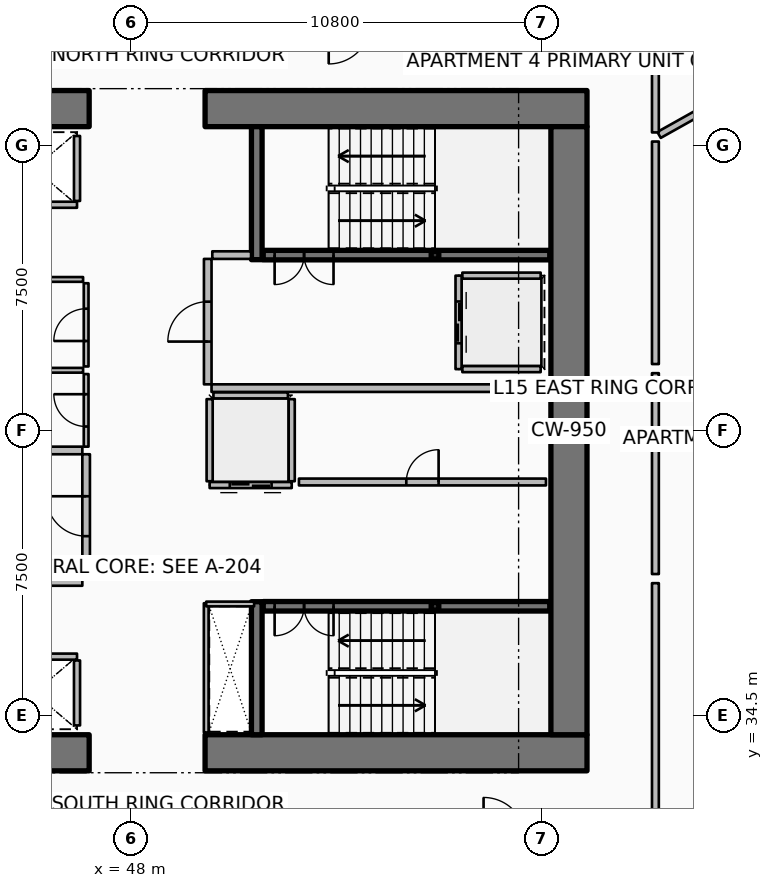
"""IFC4 building model, lengths in metres.
Left out: names, types, materials, properties, quantities, classifications, styles, units other than length and angle.
Written with IfcOpenShell. Run it as: python <this file> out.ifc"""

import sys

from ifc_helpers import new_model, si_unit, direction, frame, frame_2d, origin, origin_2d, place, context, subcontext, project, spatial, rectangle, hollow_rectangle, extrude, element, fill, save


model = new_model("IFC4")
c1 = context("Model", 3, precision=1e-05, world=origin(), true_north=direction((0.0, 1.0)))
c2 = subcontext(c1, "Body", "Model", "MODEL_VIEW")
j1 = project(units=[si_unit("LENGTHUNIT", "METRE"), si_unit("PLANEANGLEUNIT", "RADIAN")], contexts=[c1])
p1 = place(None, origin())
s1 = spatial("IfcSite", under=j1, at=p1, CompositionType="ELEMENT")
p2 = place(p1, origin())
s2 = spatial("IfcBuilding", under=s1, at=p2, CompositionType="ELEMENT")
p3 = place(p2, frame((0.0, 0.0, 63.9)))
s3 = spatial("IfcBuildingStorey", under=s2, at=p3, CompositionType="ELEMENT", Elevation=63.9)
p4 = place(p3, frame((36.85, 33.525, 0.0), z_axis=(0.0, 0.0, 1.0), x_axis=(1.0, 0.0, 0.0)))
e1 = element("IfcWall", 1, at=p4, inside=s3, PredefinedType="SHEAR", context=c2, shape_type="SweptSolid", body=[
    extrude(rectangle(XDim=10.05, YDim=0.95, at=frame_2d((5.025, 0.0))), origin(), (0.0, 0.0, 1.0), 3.75),
])
p5 = place(p3, frame((49.95, 33.525, 0.0), z_axis=(0.0, 0.0, 1.0), x_axis=(1.0, 0.0, 0.0)))
e2 = element("IfcWall", 2, at=p5, inside=s3, PredefinedType="SHEAR", context=c2, shape_type="SweptSolid", body=[
    extrude(rectangle(XDim=10.05, YDim=0.95, at=frame_2d((5.025, 0.0))), origin(), (0.0, 0.0, 1.0), 3.75),
])
p6 = place(p3, frame((36.85, 50.475, 0.0), z_axis=(0.0, 0.0, 1.0), x_axis=(1.0, 0.0, 0.0)))
e3 = element("IfcWall", 3, at=p6, inside=s3, PredefinedType="SHEAR", context=c2, shape_type="SweptSolid", body=[
    extrude(rectangle(XDim=10.05, YDim=0.95, at=frame_2d((5.025, 0.0))), origin(), (0.0, 0.0, 1.0), 3.75),
])
p7 = place(p3, frame((49.95, 50.475, 0.0), z_axis=(0.0, 0.0, 1.0), x_axis=(1.0, 0.0, 0.0)))
e4 = element("IfcWall", 4, at=p7, inside=s3, PredefinedType="SHEAR", context=c2, shape_type="SweptSolid", body=[
    extrude(rectangle(XDim=10.05, YDim=0.95, at=frame_2d((5.025, 0.0))), origin(), (0.0, 0.0, 1.0), 3.75),
])
p8 = place(p3, frame((59.525, 34.0, 0.0), z_axis=(0.0, 0.0, 1.0), x_axis=(0.0, 1.0, 0.0)))
e5 = element("IfcWall", 5, at=p8, inside=s3, PredefinedType="SHEAR", context=c2, shape_type="SweptSolid", body=[
    extrude(rectangle(XDim=16.0, YDim=0.95, at=frame_2d((8.0, 0.0))), origin(), (0.0, 0.0, 1.0), 3.75),
])
for number, where, z_axis, x_axis in (
    (6, (51.31, 46.5, 0.0), (0.0, 0.0, 1.0), (0.0, 1.0, 0.0)),
    (7, (51.31, 34.0, 0.0), (0.0, 0.0, 1.0), (0.0, 1.0, 0.0)),
):
    element("IfcWall", number, at=place(p3, frame(where, z_axis=z_axis, x_axis=x_axis)), inside=s3, PredefinedType="SHEAR", context=c2, shape_type="SweptSolid", body=[
        extrude(rectangle(XDim=3.5, YDim=0.28, at=frame_2d((1.75, 0.0))), origin(), (0.0, 0.0, 1.0), 3.75),
    ])
for number, where, z_axis, x_axis in (
    (8, (56.0, 46.62, 0.0), (0.0, 0.0, 1.0), (1.0, 0.0, 0.0)),
    (9, (56.0, 37.38, 0.0), (0.0, 0.0, 1.0), (1.0, 0.0, 0.0)),
):
    element("IfcColumn", number, at=place(p3, frame(where, z_axis=z_axis, x_axis=x_axis)), inside=s3, PredefinedType="COLUMN", context=c2, shape_type="SweptSolid", body=[
        extrude(hollow_rectangle(XDim=0.2, YDim=0.2, WallThickness=0.01, InnerFilletRadius=0.01, OuterFilletRadius=0.02, at=origin_2d()), origin(), (0.0, 0.0, 1.0), 1.67),
    ])
p9 = place(p3, frame((51.48, 46.62, 0.0), z_axis=(0.0, 0.0, 1.0), x_axis=(1.0, 0.0, 0.0)))
e10 = element("IfcWall", 10, at=p9, inside=s3, PredefinedType="SOLIDWALL", context=c2, shape_type="SweptSolid", body=[
    extrude(rectangle(XDim=7.54, YDim=0.25, at=frame_2d((3.77, 0.0))), origin(), (0.0, 0.0, 1.0), 3.5),
])
p10 = place(p9, frame((0.3, 0.0, 0.0)))
e11 = element("IfcOpeningElement", 11, at=p10, cuts=e10, PredefinedType="OPENING", context=c2, shape_type="SweptSolid", body=[
    extrude(rectangle(XDim=1.55, YDim=2.15, at=frame_2d((0.775, 1.075))), frame((0.0, 0.135, 0.0), z_axis=(0.0, -1.0, 0.0), x_axis=(1.0, 0.0, 0.0)), (0.0, 0.0, 1.0), 0.27),
])
p11 = place(p3, frame((51.48, 37.38, 0.0), z_axis=(0.0, 0.0, 1.0), x_axis=(1.0, 0.0, 0.0)))
e12 = element("IfcWall", 12, at=p11, inside=s3, PredefinedType="SOLIDWALL", context=c2, shape_type="SweptSolid", body=[
    extrude(rectangle(XDim=7.54, YDim=0.25, at=frame_2d((3.77, 0.0))), origin(), (0.0, 0.0, 1.0), 3.5),
])
p12 = place(p11, frame((0.3, 0.0, 0.0)))
e13 = element("IfcOpeningElement", 13, at=p12, cuts=e12, PredefinedType="OPENING", context=c2, shape_type="SweptSolid", body=[
    extrude(rectangle(XDim=1.55, YDim=2.15, at=frame_2d((0.775, 1.075))), frame((0.0, 0.135, 0.0), z_axis=(0.0, -1.0, 0.0), x_axis=(1.0, 0.0, 0.0)), (0.0, 0.0, 1.0), 0.27),
])
p13 = place(p3, frame((46.58, 47.945, 0.0), z_axis=(0.0, 0.0, 1.0), x_axis=(-1.0, 0.0, 0.0)))
e14 = element("IfcWall", 14, at=p13, inside=s3, PredefinedType="PARTITIONING", context=c2, shape_type="SweptSolid", body=[
    extrude(rectangle(XDim=2.26, YDim=0.16, at=frame_2d((1.13, 0.0))), origin(), (0.0, 0.0, 1.0), 3.5),
])
p14 = place(p3, frame((46.58, 48.045, 0.0), z_axis=(0.0, 0.0, 1.0), x_axis=(0.0, 1.0, 0.0)))
e15 = element("IfcWall", 15, at=p14, inside=s3, PredefinedType="PARTITIONING", context=c2, shape_type="SweptSolid", body=[
    extrude(rectangle(XDim=1.71, YDim=0.16, at=frame_2d((0.855, 0.0))), origin(), (0.0, 0.0, 1.0), 3.5),
])
p15 = place(p3, frame((44.32, 36.055, 0.0), z_axis=(0.0, 0.0, 1.0), x_axis=(1.0, 0.0, 0.0)))
e16 = element("IfcWall", 16, at=p15, inside=s3, PredefinedType="PARTITIONING", context=c2, shape_type="SweptSolid", body=[
    extrude(rectangle(XDim=2.26, YDim=0.16, at=frame_2d((1.13, 0.0))), origin(), (0.0, 0.0, 1.0), 3.5),
])
p16 = place(p3, frame((46.58, 34.245, 0.0), z_axis=(0.0, 0.0, 1.0), x_axis=(0.0, 1.0, 0.0)))
e17 = element("IfcWall", 17, at=p16, inside=s3, PredefinedType="PARTITIONING", context=c2, shape_type="SweptSolid", body=[
    extrude(rectangle(XDim=1.71, YDim=0.16, at=frame_2d((0.855, 0.0))), origin(), (0.0, 0.0, 1.0), 3.5),
])
p17 = place(p3, frame((56.62, 46.08, 0.0), z_axis=(0.0, 0.0, 1.0), x_axis=(0.0, -1.0, 0.0)))
e18 = element("IfcWall", 18, at=p17, inside=s3, PredefinedType="PARTITIONING", context=c2, shape_type="SweptSolid", body=[
    extrude(rectangle(XDim=2.46, YDim=0.16, at=frame_2d((1.23, 0.0))), origin(), (0.0, 0.0, 1.0), 3.5),
])
p18 = place(p17, frame((0.68, 0.0, 0.0)))
e19 = element("IfcOpeningElement", 19, at=p18, cuts=e18, PredefinedType="OPENING", context=c2, shape_type="SweptSolid", body=[
    extrude(rectangle(XDim=1.1, YDim=2.1, at=frame_2d((0.55, 1.05))), frame((0.0, 0.09, 0.0), z_axis=(0.0, -1.0, 0.0), x_axis=(1.0, 0.0, 0.0)), (0.0, 0.0, 1.0), 0.18),
])
for number, where, z_axis, x_axis in (
    (20, (56.72, 46.08, 0.0), (0.0, 0.0, 1.0), (1.0, 0.0, 0.0)),
    (21, (56.72, 43.62, 0.0), (0.0, 0.0, 1.0), (1.0, 0.0, 0.0)),
):
    element("IfcWall", number, at=place(p3, frame(where, z_axis=z_axis, x_axis=x_axis)), inside=s3, PredefinedType="PARTITIONING", context=c2, shape_type="SweptSolid", body=[
        extrude(rectangle(XDim=2.06, YDim=0.16, at=frame_2d((1.03, 0.0))), origin(), (0.0, 0.0, 1.0), 3.5),
    ])
p19 = place(p3, frame((52.23, 40.57, 0.0), z_axis=(0.0, 0.0, 1.0), x_axis=(-1.0, 0.0, 0.0)))
e22 = element("IfcWall", 22, at=p19, inside=s3, PredefinedType="PARTITIONING", context=c2, shape_type="SweptSolid", body=[
    extrude(rectangle(XDim=2.16, YDim=0.16, at=frame_2d((1.08, 0.0))), origin(), (0.0, 0.0, 1.0), 3.5),
])
p20 = place(p19, frame((0.53, 0.0, 0.0)))
e23 = element("IfcOpeningElement", 23, at=p20, cuts=e22, PredefinedType="OPENING", context=c2, shape_type="SweptSolid", body=[
    extrude(rectangle(XDim=1.1, YDim=2.1, at=frame_2d((0.55, 1.05))), frame((0.0, 0.09, 0.0), z_axis=(0.0, -1.0, 0.0), x_axis=(1.0, 0.0, 0.0)), (0.0, 0.0, 1.0), 0.18),
])
for number, where, z_axis, x_axis in (
    (24, (52.23, 40.67, 0.0), (0.0, 0.0, 1.0), (0.0, 1.0, 0.0)),
    (25, (50.07, 40.67, 0.0), (0.0, 0.0, 1.0), (0.0, 1.0, 0.0)),
):
    element("IfcWall", number, at=place(p3, frame(where, z_axis=z_axis, x_axis=x_axis)), inside=s3, PredefinedType="PARTITIONING", context=c2, shape_type="SweptSolid", body=[
        extrude(rectangle(XDim=2.16, YDim=0.16, at=frame_2d((1.08, 0.0))), origin(), (0.0, 0.0, 1.0), 3.5),
    ])
p21 = place(p3, frame((50.17, 42.93, 0.0), z_axis=(0.0, 0.0, 1.0), x_axis=(1.0, 0.0, 0.0)))
e26 = element("IfcWall", 26, at=p21, inside=s3, PredefinedType="PARTITIONING", context=c2, shape_type="SweptSolid", body=[
    extrude(rectangle(XDim=1.96, YDim=0.16, at=frame_2d((0.98, 0.0))), origin(), (0.0, 0.0, 1.0), 3.5),
])
p22 = place(p3, frame((52.42, 40.65, 0.0), z_axis=(0.0, 0.0, 1.0), x_axis=(1.0, 0.0, 0.0)))
e27 = element("IfcWall", 27, at=p22, inside=s3, PredefinedType="PARTITIONING", context=c2, shape_type="SweptSolid", body=[
    extrude(rectangle(XDim=6.5, YDim=0.18, at=frame_2d((3.25, 0.0))), origin(), (0.0, 0.0, 1.0), 3.5),
])
p23 = place(p22, frame((2.825, 0.0, 0.0)))
e28 = element("IfcOpeningElement", 28, at=p23, cuts=e27, PredefinedType="OPENING", context=c2, shape_type="SweptSolid", body=[
    extrude(rectangle(XDim=0.85, YDim=2.06, at=frame_2d((0.425, 1.03))), frame((0.0, 0.1, 0.0), z_axis=(0.0, -1.0, 0.0), x_axis=(1.0, 0.0, 0.0)), (0.0, 0.0, 1.0), 0.2),
])
p24 = place(p3, frame((41.35, 38.02, 0.0), z_axis=(0.0, 0.0, 1.0), x_axis=(1.0, 0.0, 0.0)))
e29 = element("IfcWall", 29, at=p24, inside=s3, PredefinedType="PARTITIONING", context=c2, shape_type="SweptSolid", body=[
    extrude(rectangle(XDim=5.37, YDim=0.2, at=frame_2d((2.685, 0.0))), origin(), (0.0, 0.0, 1.0), 3.5),
])
p25 = place(p3, frame((43.92, 41.48, 0.0), z_axis=(0.0, 0.0, 1.0), x_axis=(1.0, 0.0, 0.0)))
e30 = element("IfcWall", 30, at=p25, inside=s3, PredefinedType="PARTITIONING", context=c2, shape_type="SweptSolid", body=[
    extrude(rectangle(XDim=2.8, YDim=0.2, at=frame_2d((1.4, 0.0))), origin(), (0.0, 0.0, 1.0), 3.5),
])
p26 = place(p3, frame((46.82, 38.12, 0.0), z_axis=(0.0, 0.0, 1.0), x_axis=(0.0, 1.0, 0.0)))
e31 = element("IfcWall", 31, at=p26, inside=s3, PredefinedType="PARTITIONING", context=c2, shape_type="SweptSolid", body=[
    extrude(rectangle(XDim=3.26, YDim=0.2, at=frame_2d((1.63, 0.0))), origin(), (0.0, 0.0, 1.0), 3.5),
])
p27 = place(p26, frame((1.105, 0.0, 0.0)))
e32 = element("IfcOpeningElement", 32, at=p27, cuts=e31, PredefinedType="OPENING", context=c2, shape_type="SweptSolid", body=[
    extrude(rectangle(XDim=1.05, YDim=2.1, at=frame_2d((0.525, 1.05))), frame((0.0, 0.11, 0.0), z_axis=(0.0, -1.0, 0.0), x_axis=(1.0, 0.0, 0.0)), (0.0, 0.0, 1.0), 0.22),
])
p28 = place(p3, frame((50.12, 43.12, 0.0), z_axis=(0.0, 0.0, 1.0), x_axis=(1.0, 0.0, 0.0)))
e33 = element("IfcWall", 33, at=p28, inside=s3, PredefinedType="PARTITIONING", context=c2, shape_type="SweptSolid", body=[
    extrude(rectangle(XDim=8.88, YDim=0.2, at=frame_2d((4.44, 0.0))), origin(), (0.0, 0.0, 1.0), 3.5),
])
p29 = place(p3, frame((50.14, 46.62, 0.0), z_axis=(0.0, 0.0, 1.0), x_axis=(1.0, 0.0, 0.0)))
e34 = element("IfcWall", 34, at=p29, inside=s3, PredefinedType="PARTITIONING", context=c2, shape_type="SweptSolid", body=[
    extrude(rectangle(XDim=1.02, YDim=0.2, at=frame_2d((0.51, 0.0))), origin(), (0.0, 0.0, 1.0), 3.5),
])
p30 = place(p3, frame((50.02, 43.22, 0.0), z_axis=(0.0, 0.0, 1.0), x_axis=(0.0, 1.0, 0.0)))
e35 = element("IfcWall", 35, at=p30, inside=s3, PredefinedType="PARTITIONING", context=c2, shape_type="SweptSolid", body=[
    extrude(rectangle(XDim=3.3, YDim=0.2, at=frame_2d((1.65, 0.0))), origin(), (0.0, 0.0, 1.0), 3.5),
])
p31 = place(p30, frame((1.125, 0.0, 0.0)))
e36 = element("IfcOpeningElement", 36, at=p31, cuts=e35, PredefinedType="OPENING", context=c2, shape_type="SweptSolid", body=[
    extrude(rectangle(XDim=1.05, YDim=2.1, at=frame_2d((0.525, 1.05))), frame((0.0, 0.11, 0.0), z_axis=(0.0, -1.0, 0.0), x_axis=(1.0, 0.0, 0.0)), (0.0, 0.0, 1.0), 0.22),
])
p32 = place(p3, frame((49.98, 34.06, 0.0), z_axis=(0.0, 0.0, 1.0), x_axis=(0.0, 1.0, 0.0)))
e37 = element("IfcWall", 37, at=p32, inside=s3, PredefinedType="PARTITIONING", context=c2, shape_type="SweptSolid", body=[
    extrude(rectangle(XDim=3.4, YDim=0.125, at=frame_2d((1.7, 0.0))), origin(), (0.0, 0.0, 1.0), 2.94),
])
p33 = place(p3, frame((49.98, 37.44, 0.0), z_axis=(0.0, 0.0, 1.0), x_axis=(1.0, 0.0, 0.0)))
e38 = element("IfcWall", 38, at=p33, inside=s3, PredefinedType="PARTITIONING", context=c2, shape_type="SweptSolid", body=[
    extrude(rectangle(XDim=1.26, YDim=0.125, at=frame_2d((0.63, 0.0))), origin(), (0.0, 0.0, 1.0), 2.94),
])
p34 = place(p3, frame((44.03, 43.59, 0.0), z_axis=(0.0, 0.0, 1.0), x_axis=(1.0, 0.0, 0.0)))
e39 = element("IfcWall", 39, at=p34, inside=s3, PredefinedType="PARTITIONING", context=c2, shape_type="SweptSolid", body=[
    extrude(rectangle(XDim=2.71, YDim=0.125, at=frame_2d((1.355, 0.0))), origin(), (0.0, 0.0, 1.0), 2.94),
])
p35 = place(p3, frame((46.82, 41.58, 0.0), z_axis=(0.0, 0.0, 1.0), x_axis=(0.0, 1.0, 0.0)))
e40 = element("IfcWall", 40, at=p35, inside=s3, PredefinedType="PARTITIONING", context=c2, shape_type="SweptSolid", body=[
    extrude(rectangle(XDim=1.91, YDim=0.125, at=frame_2d((0.955, 0.0))), origin(), (0.0, 0.0, 1.0), 2.94),
])
p36 = place(p35, frame((0.53, 0.0, 0.0)))
e41 = element("IfcOpeningElement", 41, at=p36, cuts=e40, PredefinedType="OPENING", context=c2, shape_type="SweptSolid", body=[
    extrude(rectangle(XDim=0.85, YDim=2.06, at=frame_2d((0.425, 1.03))), frame((0.0, 0.073, 0.0), z_axis=(0.0, -1.0, 0.0), x_axis=(1.0, 0.0, 0.0)), (0.0, 0.0, 1.0), 0.145),
])
p37 = place(p3, frame((46.82, 43.69, 0.0), z_axis=(0.0, 0.0, 1.0), x_axis=(0.0, 1.0, 0.0)))
e42 = element("IfcWall", 42, at=p37, inside=s3, PredefinedType="PARTITIONING", context=c2, shape_type="SweptSolid", body=[
    extrude(rectangle(XDim=2.19, YDim=0.125, at=frame_2d((1.095, 0.0))), origin(), (0.0, 0.0, 1.0), 2.94),
])
p38 = place(p37, frame((0.67, 0.0, 0.0)))
e43 = element("IfcOpeningElement", 43, at=p38, cuts=e42, PredefinedType="OPENING", context=c2, shape_type="SweptSolid", body=[
    extrude(rectangle(XDim=0.85, YDim=2.06, at=frame_2d((0.425, 1.03))), frame((0.0, 0.073, 0.0), z_axis=(0.0, -1.0, 0.0), x_axis=(1.0, 0.0, 0.0)), (0.0, 0.0, 1.0), 0.145),
])
p39 = place(p3, frame((45.48, 45.98, 0.0), z_axis=(0.0, 0.0, 1.0), x_axis=(1.0, 0.0, 0.0)))
e44 = element("IfcWall", 44, at=p39, inside=s3, PredefinedType="PARTITIONING", context=c2, shape_type="SweptSolid", body=[
    extrude(rectangle(XDim=1.26, YDim=0.125, at=frame_2d((0.63, 0.0))), origin(), (0.0, 0.0, 1.0), 2.94),
])
p40 = place(p3, frame((61.896, 49.782, 0.0), z_axis=(0.0, 0.0, 1.0), x_axis=(0.872493215695, 0.488626225828, 0.0)))
e45 = element("IfcWall", 45, at=p40, inside=s3, PredefinedType="PARTITIONING", context=c2, shape_type="SweptSolid", body=[
    extrude(rectangle(XDim=15.612, YDim=0.18, at=frame_2d((7.806, 0.0))), origin(), (0.0, 0.0, 1.0), 2.867),
])
p41 = place(p3, frame((61.8, 31.37, 0.0), z_axis=(0.0, 0.0, 1.0), x_axis=(0.0, 1.0, 0.0)))
e46 = element("IfcWall", 46, at=p41, inside=s3, PredefinedType="PARTITIONING", context=c2, shape_type="SweptSolid", body=[
    extrude(rectangle(XDim=6.618, YDim=0.18, at=frame_2d((3.309, 0.0))), origin(), (0.0, 0.0, 1.0), 2.867),
])
p42 = place(p3, frame((61.8, 38.228, 0.0), z_axis=(0.0, 0.0, 1.0), x_axis=(0.0, 1.0, 0.0)))
e47 = element("IfcWall", 47, at=p42, inside=s3, PredefinedType="PARTITIONING", context=c2, shape_type="SweptSolid", body=[
    extrude(rectangle(XDim=5.285, YDim=0.18, at=frame_2d((2.643, 0.0))), origin(), (0.0, 0.0, 1.0), 2.867),
])
p43 = place(p3, frame((61.8, 43.753, 0.0), z_axis=(0.0, 0.0, 1.0), x_axis=(0.0, 1.0, 0.0)))
e48 = element("IfcWall", 48, at=p43, inside=s3, PredefinedType="PARTITIONING", context=c2, shape_type="SweptSolid", body=[
    extrude(rectangle(XDim=5.855, YDim=0.18, at=frame_2d((2.927, 0.0))), origin(), (0.0, 0.0, 1.0), 2.867),
])
p44 = place(p3, frame((61.8, 49.848, 0.0), z_axis=(0.0, 0.0, 1.0), x_axis=(0.0, 1.0, 0.0)))
e49 = element("IfcWall", 49, at=p44, inside=s3, PredefinedType="PARTITIONING", context=c2, shape_type="SweptSolid", body=[
    extrude(rectangle(XDim=2.781, YDim=0.18, at=frame_2d((1.391, 0.0))), origin(), (0.0, 0.0, 1.0), 2.867),
])
p45 = place(p10, origin())
e50 = element("IfcDoor", 50, at=p45, inside=s3, OperationType="DOUBLE_DOOR_SINGLE_SWING", PredefinedType="DOOR", context=c2, shape_type="SweptSolid", body=[
    extrude(rectangle(XDim=1.55, YDim=2.15, at=frame_2d((0.775, 1.075))), frame((0.0, 0.025, 0.0), z_axis=(0.0, -1.0, 0.0), x_axis=(1.0, 0.0, 0.0)), (0.0, 0.0, 1.0), 0.05),
])
fill(e11, e50)
p46 = place(p12, origin())
e51 = element("IfcDoor", 51, at=p46, inside=s3, OperationType="DOUBLE_DOOR_SINGLE_SWING", PredefinedType="DOOR", context=c2, shape_type="SweptSolid", body=[
    extrude(rectangle(XDim=1.55, YDim=2.15, at=frame_2d((0.775, 1.075))), frame((0.0, 0.025, 0.0), z_axis=(0.0, -1.0, 0.0), x_axis=(1.0, 0.0, 0.0)), (0.0, 0.0, 1.0), 0.05),
])
fill(e13, e51)
p47 = place(p18, origin())
e52 = element("IfcDoor", 52, at=p47, inside=s3, OperationType="DOUBLE_DOOR_SLIDING", PredefinedType="DOOR", context=c2, shape_type="SweptSolid", body=[
    extrude(rectangle(XDim=1.1, YDim=2.1, at=frame_2d((0.55, 1.05))), frame((0.0, 0.025, 0.0), z_axis=(0.0, -1.0, 0.0), x_axis=(1.0, 0.0, 0.0)), (0.0, 0.0, 1.0), 0.05),
])
fill(e19, e52)
p48 = place(p20, origin())
e53 = element("IfcDoor", 53, at=p48, inside=s3, OperationType="DOUBLE_DOOR_SLIDING", PredefinedType="DOOR", context=c2, shape_type="SweptSolid", body=[
    extrude(rectangle(XDim=1.1, YDim=2.1, at=frame_2d((0.55, 1.05))), frame((0.0, 0.025, 0.0), z_axis=(0.0, -1.0, 0.0), x_axis=(1.0, 0.0, 0.0)), (0.0, 0.0, 1.0), 0.05),
])
fill(e23, e53)
p49 = place(p23, origin())
e54 = element("IfcDoor", 54, at=p49, inside=s3, OperationType="SINGLE_SWING_RIGHT", PredefinedType="DOOR", context=c2, shape_type="SweptSolid", body=[
    extrude(rectangle(XDim=0.85, YDim=2.06, at=frame_2d((0.425, 1.03))), frame((0.0, 0.025, 0.0), z_axis=(0.0, -1.0, 0.0), x_axis=(1.0, 0.0, 0.0)), (0.0, 0.0, 1.0), 0.05),
])
fill(e28, e54)
p50 = place(p27, origin())
e55 = element("IfcDoor", 55, at=p50, inside=s3, OperationType="SINGLE_SWING_RIGHT", PredefinedType="DOOR", context=c2, shape_type="SweptSolid", body=[
    extrude(rectangle(XDim=1.05, YDim=2.1, at=frame_2d((0.525, 1.05))), frame((0.0, 0.025, 0.0), z_axis=(0.0, -1.0, 0.0), x_axis=(1.0, 0.0, 0.0)), (0.0, 0.0, 1.0), 0.05),
])
fill(e32, e55)
p51 = place(p31, origin())
e56 = element("IfcDoor", 56, at=p51, inside=s3, OperationType="SINGLE_SWING_LEFT", PredefinedType="DOOR", context=c2, shape_type="SweptSolid", body=[
    extrude(rectangle(XDim=1.05, YDim=2.1, at=frame_2d((0.525, 1.05))), frame((0.0, 0.025, 0.0), z_axis=(0.0, -1.0, 0.0), x_axis=(1.0, 0.0, 0.0)), (0.0, 0.0, 1.0), 0.05),
])
fill(e36, e56)
p52 = place(p36, origin())
e57 = element("IfcDoor", 57, at=p52, inside=s3, OperationType="SINGLE_SWING_RIGHT", PredefinedType="DOOR", context=c2, shape_type="SweptSolid", body=[
    extrude(rectangle(XDim=0.85, YDim=2.06, at=frame_2d((0.425, 1.03))), frame((0.0, 0.025, 0.0), z_axis=(0.0, -1.0, 0.0), x_axis=(1.0, 0.0, 0.0)), (0.0, 0.0, 1.0), 0.05),
])
fill(e41, e57)
p53 = place(p38, origin())
e58 = element("IfcDoor", 58, at=p53, inside=s3, OperationType="SINGLE_SWING_LEFT", PredefinedType="DOOR", context=c2, shape_type="SweptSolid", body=[
    extrude(rectangle(XDim=0.85, YDim=2.06, at=frame_2d((0.425, 1.03))), frame((0.0, 0.025, 0.0), z_axis=(0.0, -1.0, 0.0), x_axis=(1.0, 0.0, 0.0)), (0.0, 0.0, 1.0), 0.05),
])
fill(e43, e58)
save(model, sys.argv[1])
